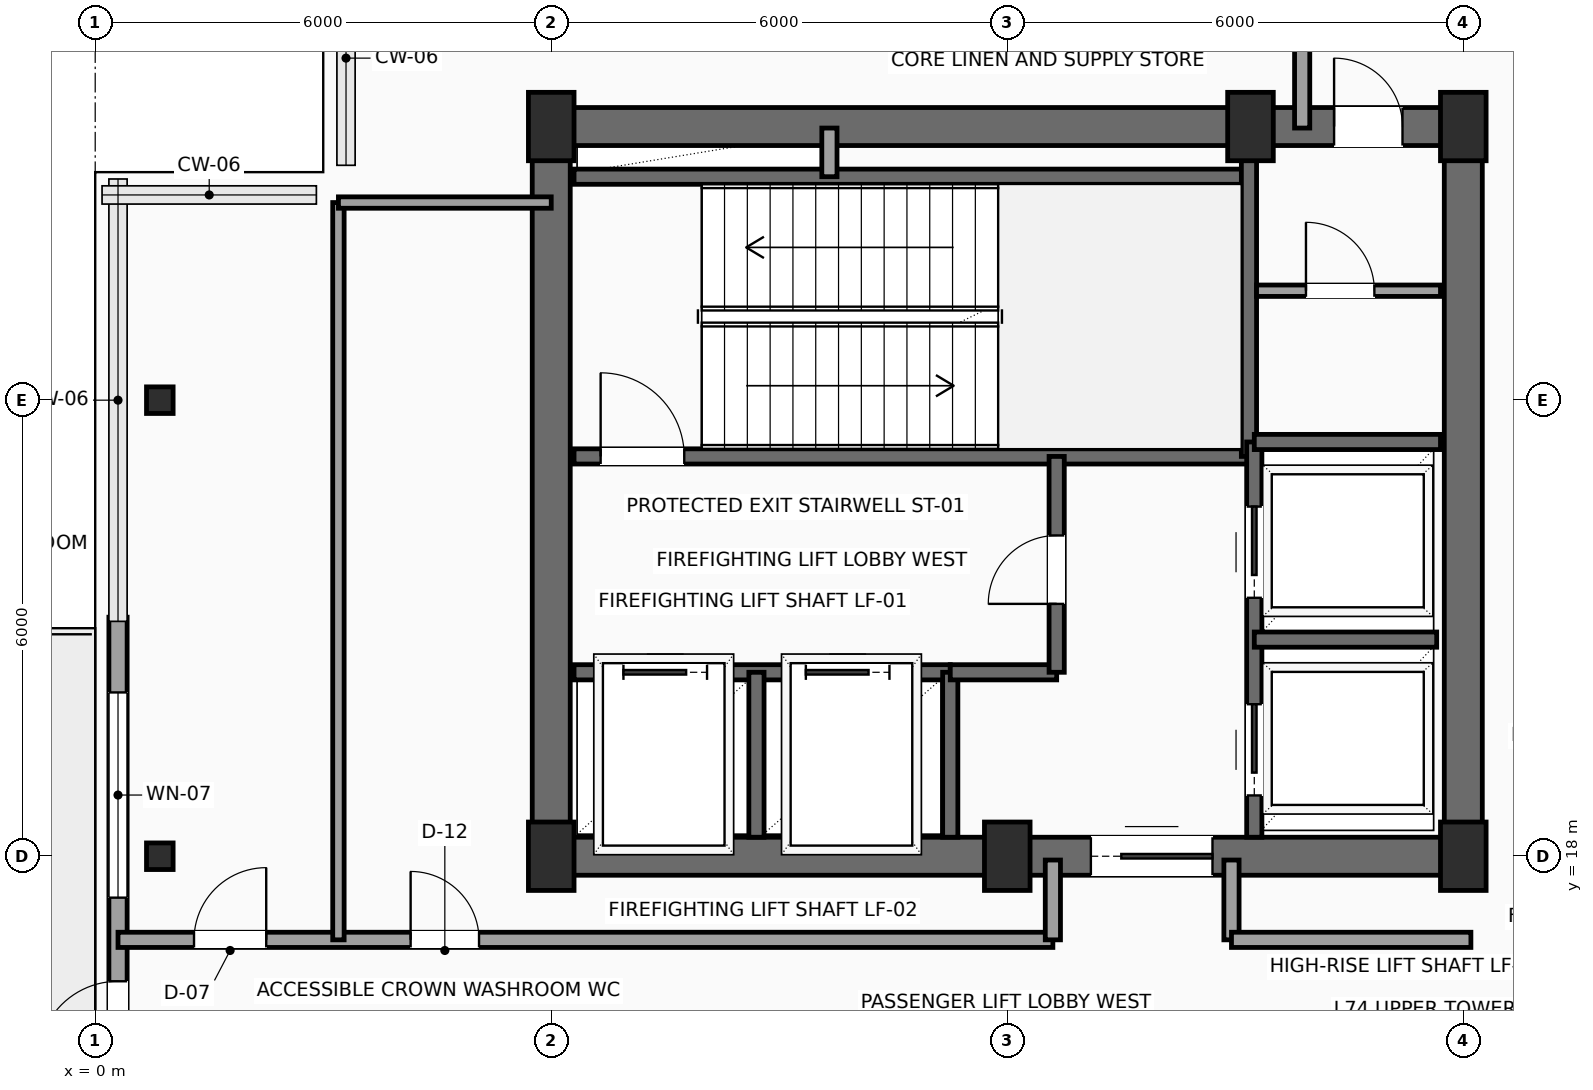
"""IFC4 building model, lengths in metres.
Left out: names, types, materials, properties, quantities, classifications, styles, units other than length and angle.
Written with IfcOpenShell. Run it as: python <this file> out.ifc"""

import sys

from ifc_helpers import new_model, si_unit, direction, frame, frame_2d, origin, origin_2d, place, context, subcontext, project, spatial, rectangle, hollow_rectangle, extrude, element, fill, save


model = new_model("IFC4")
c1 = context("Model", 3, precision=1e-05, world=origin(), true_north=direction((0.0, 1.0)))
c2 = subcontext(c1, "Body", "Model", "MODEL_VIEW")
j1 = project(units=[si_unit("LENGTHUNIT", "METRE"), si_unit("PLANEANGLEUNIT", "RADIAN")], contexts=[c1])
p1 = place(None, origin())
s1 = spatial("IfcSite", under=j1, at=p1, CompositionType="ELEMENT")
p2 = place(p1, origin())
s2 = spatial("IfcBuilding", under=s1, at=p2, CompositionType="ELEMENT")
p3 = place(p2, frame((0.0, 0.0, 292.2)))
s3 = spatial("IfcBuildingStorey", under=s2, at=p3, CompositionType="ELEMENT", Elevation=292.2)
for number, where, z_axis, x_axis in (
    (1, (6.0, 18.0, 0.0), (0.0, 0.0, 1.0), (1.0, 0.0, 0.0)),
    (2, (12.0, 18.0, 0.0), (0.0, 0.0, 1.0), (1.0, 0.0, 0.0)),
    (3, (18.0, 18.0, 0.0), (0.0, 0.0, 1.0), (1.0, 0.0, 0.0)),
    (4, (6.0, 27.6, 0.0), (0.0, 0.0, 1.0), (1.0, 0.0, 0.0)),
    (5, (15.2, 27.6, 0.0), (0.0, 0.0, 1.0), (1.0, 0.0, 0.0)),
    (6, (18.0, 27.6, 0.0), (0.0, 0.0, 1.0), (1.0, 0.0, 0.0)),
):
    element("IfcColumn", number, at=place(p3, frame(where, z_axis=z_axis, x_axis=x_axis)), inside=s3, PredefinedType="COLUMN", context=c2, shape_type="SweptSolid", body=[
        extrude(rectangle(XDim=0.6, YDim=0.9, at=origin_2d()), origin(), (0.0, 0.0, 1.0), 4.2),
    ])
for number, where, z_axis, x_axis in (
    (7, (0.85, 18.0, 0.0), (0.0, 0.0, 1.0), (1.0, 0.0, 0.0)),
    (8, (0.85, 24.0, 0.0), (0.0, 0.0, 1.0), (1.0, 0.0, 0.0)),
):
    element("IfcColumn", number, at=place(p3, frame(where, z_axis=z_axis, x_axis=x_axis)), inside=s3, PredefinedType="COLUMN", context=c2, shape_type="SweptSolid", body=[
        extrude(hollow_rectangle(XDim=0.35, YDim=0.35, WallThickness=0.016, InnerFilletRadius=0.016, OuterFilletRadius=0.032, at=origin_2d()), origin(), (0.0, 0.0, 1.0), 4.2),
    ])
p4 = place(p3, frame((0.3, 11.855, 0.0), z_axis=(0.0, 0.0, 1.0), x_axis=(0.0, 1.0, 0.0)))
e9 = element("IfcWall", 9, at=p4, inside=s3, PredefinedType="SOLIDWALL", context=c2, shape_type="SweptSolid", body=[
    extrude(rectangle(XDim=9.29, YDim=0.24, at=frame_2d((4.645, 0.0))), origin(), (0.0, 0.0, 1.0), 4.0),
])
p5 = place(p4, frame((3.45, 0.0, 0.0)))
e10 = element("IfcOpeningElement", 10, at=p5, cuts=e9, PredefinedType="OPENING", context=c2, shape_type="SweptSolid", body=[
    extrude(rectangle(XDim=1.05, YDim=2.2, at=frame_2d((0.525, 1.1))), frame((0.0, 0.13, 0.0), z_axis=(0.0, -1.0, 0.0), x_axis=(1.0, 0.0, 0.0)), (0.0, 0.0, 1.0), 0.26),
])
p6 = place(p4, frame((5.6, 0.0, 0.6)))
e11 = element("IfcOpeningElement", 11, at=p6, cuts=e9, PredefinedType="OPENING", context=c2, shape_type="SweptSolid", body=[
    extrude(rectangle(XDim=2.7, YDim=2.3, at=frame_2d((1.35, 1.15))), frame((0.0, 0.13, 0.0), z_axis=(0.0, -1.0, 0.0), x_axis=(1.0, 0.0, 0.0)), (0.0, 0.0, 1.0), 0.26),
])
p7 = place(p4, frame((0.7, 0.0, 0.6)))
e12 = element("IfcOpeningElement", 12, at=p7, cuts=e9, PredefinedType="OPENING", context=c2, shape_type="SweptSolid", body=[
    extrude(rectangle(XDim=0.9, YDim=2.2, at=frame_2d((0.45, 1.1))), frame((0.0, 0.13, 0.0), z_axis=(0.0, -1.0, 0.0), x_axis=(1.0, 0.0, 0.0)), (0.0, 0.0, 1.0), 0.26),
])
p8 = place(p3, frame((6.0, 18.0, 0.0), z_axis=(0.0, 0.0, 1.0), x_axis=(1.0, 0.0, 0.0)))
e13 = element("IfcWall", 13, at=p8, inside=s3, PredefinedType="SHEAR", context=c2, shape_type="SweptSolid", body=[
    extrude(rectangle(XDim=12.0, YDim=0.5, at=frame_2d((6.0, 0.0))), origin(), (0.0, 0.0, 1.0), 4.0),
])
p9 = place(p8, frame((7.1, 0.0, 0.0)))
e14 = element("IfcOpeningElement", 14, at=p9, cuts=e13, PredefinedType="OPENING", context=c2, shape_type="SweptSolid", body=[
    extrude(rectangle(XDim=1.6, YDim=2.3, at=frame_2d((0.8, 1.15))), frame((0.0, 0.26, 0.0), z_axis=(0.0, -1.0, 0.0), x_axis=(1.0, 0.0, 0.0)), (0.0, 0.0, 1.0), 0.52),
])
p10 = place(p3, frame((6.0, 27.6, 0.0), z_axis=(0.0, 0.0, 1.0), x_axis=(1.0, 0.0, 0.0)))
e15 = element("IfcWall", 15, at=p10, inside=s3, PredefinedType="SHEAR", context=c2, shape_type="SweptSolid", body=[
    extrude(rectangle(XDim=12.0, YDim=0.5, at=frame_2d((6.0, 0.0))), origin(), (0.0, 0.0, 1.0), 4.0),
])
p11 = place(p10, frame((10.3, 0.0, 0.0)))
e16 = element("IfcOpeningElement", 16, at=p11, cuts=e15, PredefinedType="OPENING", context=c2, shape_type="SweptSolid", body=[
    extrude(rectangle(XDim=0.9, YDim=2.15, at=frame_2d((0.45, 1.075))), frame((0.0, 0.26, 0.0), z_axis=(0.0, -1.0, 0.0), x_axis=(1.0, 0.0, 0.0)), (0.0, 0.0, 1.0), 0.52),
])
for number, where, z_axis, x_axis in (
    (17, (6.0, 18.0, 0.0), (0.0, 0.0, 1.0), (0.0, 1.0, 0.0)),
    (18, (18.0, 18.0, 0.0), (0.0, 0.0, 1.0), (0.0, 1.0, 0.0)),
):
    element("IfcWall", number, at=place(p3, frame(where, z_axis=z_axis, x_axis=x_axis)), inside=s3, PredefinedType="SHEAR", context=c2, shape_type="SweptSolid", body=[
        extrude(rectangle(XDim=9.6, YDim=0.5, at=frame_2d((4.8, 0.0))), origin(), (0.0, 0.0, 1.0), 4.0),
    ])
p12 = place(p3, frame((6.3, 23.26, 0.0), z_axis=(0.0, 0.0, 1.0), x_axis=(1.0, 0.0, 0.0)))
e19 = element("IfcWall", 19, at=p12, inside=s3, PredefinedType="SHEAR", context=c2, shape_type="SweptSolid", body=[
    extrude(rectangle(XDim=8.88, YDim=0.2, at=frame_2d((4.44, 0.0))), origin(), (0.0, 0.0, 1.0), 4.0),
])
p13 = place(p12, frame((0.35, 0.0, 0.0)))
e20 = element("IfcOpeningElement", 20, at=p13, cuts=e19, PredefinedType="OPENING", context=c2, shape_type="SweptSolid", body=[
    extrude(rectangle(XDim=1.1, YDim=2.2, at=frame_2d((0.55, 1.1))), frame((0.0, 0.11, 0.0), z_axis=(0.0, -1.0, 0.0), x_axis=(1.0, 0.0, 0.0)), (0.0, 0.0, 1.0), 0.22),
])
p14 = place(p3, frame((6.3, 26.94, 0.0), z_axis=(0.0, 0.0, 1.0), x_axis=(1.0, 0.0, 0.0)))
e21 = element("IfcWall", 21, at=p14, inside=s3, PredefinedType="SHEAR", context=c2, shape_type="SweptSolid", body=[
    extrude(rectangle(XDim=8.88, YDim=0.2, at=frame_2d((4.44, 0.0))), origin(), (0.0, 0.0, 1.0), 4.0),
])
p15 = place(p3, frame((15.18, 23.26, 0.0), z_axis=(0.0, 0.0, 1.0), x_axis=(0.0, 1.0, 0.0)))
e22 = element("IfcWall", 22, at=p15, inside=s3, PredefinedType="SHEAR", context=c2, shape_type="SweptSolid", body=[
    extrude(rectangle(XDim=4.04, YDim=0.2, at=frame_2d((2.02, 0.0))), origin(), (0.0, 0.0, 1.0), 4.0),
])
p16 = place(p3, frame((6.3, 20.42, 0.0), z_axis=(0.0, 0.0, 1.0), x_axis=(1.0, 0.0, 0.0)))
e23 = element("IfcWall", 23, at=p16, inside=s3, PredefinedType="SHEAR", context=c2, shape_type="SweptSolid", body=[
    extrude(rectangle(XDim=4.95, YDim=0.2, at=frame_2d((2.475, 0.0))), origin(), (0.0, 0.0, 1.0), 4.0),
])
p17 = place(p16, frame((0.65, 0.0, 0.0)))
e24 = element("IfcOpeningElement", 24, at=p17, cuts=e23, PredefinedType="OPENING", context=c2, shape_type="SweptSolid", body=[
    extrude(rectangle(XDim=1.1, YDim=2.2, at=frame_2d((0.55, 1.1))), frame((0.0, 0.11, 0.0), z_axis=(0.0, -1.0, 0.0), x_axis=(1.0, 0.0, 0.0)), (0.0, 0.0, 1.0), 0.22),
])
p18 = place(p16, frame((3.05, 0.0, 0.0)))
e25 = element("IfcOpeningElement", 25, at=p18, cuts=e23, PredefinedType="OPENING", context=c2, shape_type="SweptSolid", body=[
    extrude(rectangle(XDim=1.1, YDim=2.2, at=frame_2d((0.55, 1.1))), frame((0.0, 0.11, 0.0), z_axis=(0.0, -1.0, 0.0), x_axis=(1.0, 0.0, 0.0)), (0.0, 0.0, 1.0), 0.22),
])
for number, where, z_axis, x_axis in (
    (26, (8.7, 18.25, 0.0), (0.0, 0.0, 1.0), (0.0, 1.0, 0.0)),
    (27, (11.25, 18.25, 0.0), (0.0, 0.0, 1.0), (0.0, 1.0, 0.0)),
):
    element("IfcWall", number, at=place(p3, frame(where, z_axis=z_axis, x_axis=x_axis)), inside=s3, PredefinedType="SHEAR", context=c2, shape_type="SweptSolid", body=[
        extrude(rectangle(XDim=2.17, YDim=0.2, at=frame_2d((1.085, 0.0))), origin(), (0.0, 0.0, 1.0), 4.0),
    ])
p19 = place(p3, frame((11.25, 20.42, 0.0), z_axis=(0.0, 0.0, 1.0), x_axis=(1.0, 0.0, 0.0)))
e28 = element("IfcWall", 28, at=p19, inside=s3, PredefinedType="SHEAR", context=c2, shape_type="SweptSolid", body=[
    extrude(rectangle(XDim=1.4, YDim=0.2, at=frame_2d((0.7, 0.0))), origin(), (0.0, 0.0, 1.0), 4.0),
])
p20 = place(p3, frame((12.65, 20.42, 0.0), z_axis=(0.0, 0.0, 1.0), x_axis=(0.0, 1.0, 0.0)))
e29 = element("IfcWall", 29, at=p20, inside=s3, PredefinedType="SHEAR", context=c2, shape_type="SweptSolid", body=[
    extrude(rectangle(XDim=2.84, YDim=0.2, at=frame_2d((1.42, 0.0))), origin(), (0.0, 0.0, 1.0), 4.0),
])
p21 = place(p20, frame((0.9, 0.0, 0.0)))
e30 = element("IfcOpeningElement", 30, at=p21, cuts=e29, PredefinedType="OPENING", context=c2, shape_type="SweptSolid", body=[
    extrude(rectangle(XDim=0.9, YDim=2.15, at=frame_2d((0.45, 1.075))), frame((0.0, 0.11, 0.0), z_axis=(0.0, -1.0, 0.0), x_axis=(1.0, 0.0, 0.0)), (0.0, 0.0, 1.0), 0.22),
])
p22 = place(p3, frame((9.66, 26.94, 0.0), z_axis=(0.0, 0.0, 1.0), x_axis=(0.0, 1.0, 0.0)))
e31 = element("IfcWall", 31, at=p22, inside=s3, PredefinedType="SOLIDWALL", context=c2, shape_type="SweptSolid", body=[
    extrude(rectangle(XDim=0.64, YDim=0.2, at=frame_2d((0.32, 0.0))), origin(), (0.0, 0.0, 1.0), 4.0),
])
p23 = place(p3, frame((15.25, 18.25, 0.0), z_axis=(0.0, 0.0, 1.0), x_axis=(0.0, 1.0, 0.0)))
e32 = element("IfcWall", 32, at=p23, inside=s3, PredefinedType="SHEAR", context=c2, shape_type="SweptSolid", body=[
    extrude(rectangle(XDim=5.2, YDim=0.2, at=frame_2d((2.6, 0.0))), origin(), (0.0, 0.0, 1.0), 4.0),
])
p24 = place(p23, frame((0.55, 0.0, 0.0)))
e33 = element("IfcOpeningElement", 33, at=p24, cuts=e32, PredefinedType="OPENING", context=c2, shape_type="SweptSolid", body=[
    extrude(rectangle(XDim=1.2, YDim=2.2, at=frame_2d((0.6, 1.1))), frame((0.0, 0.11, 0.0), z_axis=(0.0, -1.0, 0.0), x_axis=(1.0, 0.0, 0.0)), (0.0, 0.0, 1.0), 0.22),
])
p25 = place(p23, frame((3.15, 0.0, 0.0)))
e34 = element("IfcOpeningElement", 34, at=p25, cuts=e32, PredefinedType="OPENING", context=c2, shape_type="SweptSolid", body=[
    extrude(rectangle(XDim=1.2, YDim=2.2, at=frame_2d((0.6, 1.1))), frame((0.0, 0.11, 0.0), z_axis=(0.0, -1.0, 0.0), x_axis=(1.0, 0.0, 0.0)), (0.0, 0.0, 1.0), 0.22),
])
p26 = place(p3, frame((15.25, 20.85, 0.0), z_axis=(0.0, 0.0, 1.0), x_axis=(1.0, 0.0, 0.0)))
e35 = element("IfcWall", 35, at=p26, inside=s3, PredefinedType="SHEAR", context=c2, shape_type="SweptSolid", body=[
    extrude(rectangle(XDim=2.4, YDim=0.2, at=frame_2d((1.2, 0.0))), origin(), (0.0, 0.0, 1.0), 4.0),
])
p27 = place(p3, frame((15.25, 23.45, 0.0), z_axis=(0.0, 0.0, 1.0), x_axis=(1.0, 0.0, 0.0)))
e36 = element("IfcWall", 36, at=p27, inside=s3, PredefinedType="SHEAR", context=c2, shape_type="SweptSolid", body=[
    extrude(rectangle(XDim=2.45, YDim=0.2, at=frame_2d((1.225, 0.0))), origin(), (0.0, 0.0, 1.0), 4.0),
])
p28 = place(p3, frame((15.28, 25.44, 0.0), z_axis=(0.0, 0.0, 1.0), x_axis=(1.0, 0.0, 0.0)))
e37 = element("IfcWall", 37, at=p28, inside=s3, PredefinedType="PARTITIONING", context=c2, shape_type="SweptSolid", body=[
    extrude(rectangle(XDim=2.42, YDim=0.15, at=frame_2d((1.21, 0.0))), origin(), (0.0, 0.0, 1.0), 4.0),
])
p29 = place(p28, frame((0.65, 0.0, 0.0)))
e38 = element("IfcOpeningElement", 38, at=p29, cuts=e37, PredefinedType="OPENING", context=c2, shape_type="SweptSolid", body=[
    extrude(rectangle(XDim=0.9, YDim=2.15, at=frame_2d((0.45, 1.075))), frame((0.0, 0.085, 0.0), z_axis=(0.0, -1.0, 0.0), x_axis=(1.0, 0.0, 0.0)), (0.0, 0.0, 1.0), 0.17),
])
p30 = place(p3, frame((0.3, 16.9, 0.0), z_axis=(0.0, 0.0, 1.0), x_axis=(1.0, 0.0, 0.0)))
e39 = element("IfcWall", 39, at=p30, inside=s3, PredefinedType="PARTITIONING", context=c2, shape_type="SweptSolid", body=[
    extrude(rectangle(XDim=12.3, YDim=0.2, at=frame_2d((6.15, 0.0))), origin(), (0.0, 0.0, 1.0), 4.0),
])
p31 = place(p30, frame((1.0, 0.0, 0.0)))
e40 = element("IfcOpeningElement", 40, at=p31, cuts=e39, PredefinedType="OPENING", context=c2, shape_type="SweptSolid", body=[
    extrude(rectangle(XDim=0.95, YDim=2.15, at=frame_2d((0.475, 1.075))), frame((0.0, 0.11, 0.0), z_axis=(0.0, -1.0, 0.0), x_axis=(1.0, 0.0, 0.0)), (0.0, 0.0, 1.0), 0.22),
])
p32 = place(p30, frame((3.85, 0.0, 0.0)))
e41 = element("IfcOpeningElement", 41, at=p32, cuts=e39, PredefinedType="OPENING", context=c2, shape_type="SweptSolid", body=[
    extrude(rectangle(XDim=0.9, YDim=2.1, at=frame_2d((0.45, 1.05))), frame((0.0, 0.11, 0.0), z_axis=(0.0, -1.0, 0.0), x_axis=(1.0, 0.0, 0.0)), (0.0, 0.0, 1.0), 0.22),
])
for number, where, z_axis, x_axis in (
    (42, (12.6, 16.9, 0.0), (0.0, 0.0, 1.0), (0.0, 1.0, 0.0)),
    (43, (14.95, 17.95, 0.0), (0.0, 0.0, 1.0), (0.0, -1.0, 0.0)),
):
    element("IfcWall", number, at=place(p3, frame(where, z_axis=z_axis, x_axis=x_axis)), inside=s3, PredefinedType="PARTITIONING", context=c2, shape_type="SweptSolid", body=[
        extrude(rectangle(XDim=1.05, YDim=0.2, at=frame_2d((0.525, 0.0))), origin(), (0.0, 0.0, 1.0), 4.0),
    ])
p33 = place(p3, frame((14.95, 16.9, 0.0), z_axis=(0.0, 0.0, 1.0), x_axis=(1.0, 0.0, 0.0)))
e44 = element("IfcWall", 44, at=p33, inside=s3, PredefinedType="PARTITIONING", context=c2, shape_type="SweptSolid", body=[
    extrude(rectangle(XDim=3.15, YDim=0.2, at=frame_2d((1.575, 0.0))), origin(), (0.0, 0.0, 1.0), 4.0),
])
p34 = place(p3, frame((15.88, 27.58, 0.0), z_axis=(0.0, 0.0, 1.0), x_axis=(0.0, 1.0, 0.0)))
e45 = element("IfcWall", 45, at=p34, inside=s3, PredefinedType="PARTITIONING", context=c2, shape_type="SweptSolid", body=[
    extrude(rectangle(XDim=2.12, YDim=0.2, at=frame_2d((1.06, 0.0))), origin(), (0.0, 0.0, 1.0), 4.0),
])
p35 = place(p3, frame((3.2, 16.9, 0.0), z_axis=(0.0, 0.0, 1.0), x_axis=(0.0, 1.0, 0.0)))
e46 = element("IfcWall", 46, at=p35, inside=s3, PredefinedType="PARTITIONING", context=c2, shape_type="SweptSolid", body=[
    extrude(rectangle(XDim=9.7, YDim=0.15, at=frame_2d((4.85, 0.0))), origin(), (0.0, 0.0, 1.0), 4.0),
])
p36 = place(p3, frame((3.2, 26.6, 0.0), z_axis=(0.0, 0.0, 1.0), x_axis=(1.0, 0.0, 0.0)))
e47 = element("IfcWall", 47, at=p36, inside=s3, PredefinedType="PARTITIONING", context=c2, shape_type="SweptSolid", body=[
    extrude(rectangle(XDim=2.8, YDim=0.15, at=frame_2d((1.4, 0.0))), origin(), (0.0, 0.0, 1.0), 4.0),
])
p37 = place(p5, origin())
e48 = element("IfcDoor", 48, at=p37, inside=s3, OperationType="SINGLE_SWING_LEFT", PredefinedType="DOOR", context=c2, shape_type="SweptSolid", body=[
    extrude(rectangle(XDim=1.05, YDim=2.2, at=frame_2d((0.525, 1.1))), frame((0.0, 0.025, 0.0), z_axis=(0.0, -1.0, 0.0), x_axis=(1.0, 0.0, 0.0)), (0.0, 0.0, 1.0), 0.05),
])
fill(e10, e48)
p38 = place(p6, origin())
e49 = element("IfcWindow", 49, at=p38, inside=s3, PartitioningType="SINGLE_PANEL", PredefinedType="WINDOW", context=c2, shape_type="SweptSolid", body=[
    extrude(rectangle(XDim=2.7, YDim=2.3, at=frame_2d((1.35, 1.15))), frame((0.0, 0.03, 0.0), z_axis=(0.0, -1.0, 0.0), x_axis=(1.0, 0.0, 0.0)), (0.0, 0.0, 1.0), 0.06),
])
fill(e11, e49)
p39 = place(p9, origin())
e50 = element("IfcDoor", 50, at=p39, inside=s3, OperationType="DOUBLE_DOOR_SLIDING", PredefinedType="DOOR", context=c2, shape_type="SweptSolid", body=[
    extrude(rectangle(XDim=1.6, YDim=2.3, at=frame_2d((0.8, 1.15))), frame((0.0, 0.025, 0.0), z_axis=(0.0, -1.0, 0.0), x_axis=(1.0, 0.0, 0.0)), (0.0, 0.0, 1.0), 0.05),
])
fill(e14, e50)
p40 = place(p11, origin())
e51 = element("IfcDoor", 51, at=p40, inside=s3, OperationType="SINGLE_SWING_LEFT", PredefinedType="DOOR", context=c2, shape_type="SweptSolid", body=[
    extrude(rectangle(XDim=0.9, YDim=2.15, at=frame_2d((0.45, 1.075))), frame((0.0, 0.025, 0.0), z_axis=(0.0, -1.0, 0.0), x_axis=(1.0, 0.0, 0.0)), (0.0, 0.0, 1.0), 0.05),
])
fill(e16, e51)
p41 = place(p13, origin())
e52 = element("IfcDoor", 52, at=p41, inside=s3, OperationType="SINGLE_SWING_LEFT", PredefinedType="DOOR", context=c2, shape_type="SweptSolid", body=[
    extrude(rectangle(XDim=1.1, YDim=2.2, at=frame_2d((0.55, 1.1))), frame((0.0, 0.025, 0.0), z_axis=(0.0, -1.0, 0.0), x_axis=(1.0, 0.0, 0.0)), (0.0, 0.0, 1.0), 0.05),
])
fill(e20, e52)
p42 = place(p17, origin())
e53 = element("IfcDoor", 53, at=p42, inside=s3, OperationType="SLIDING_TO_LEFT", PredefinedType="DOOR", context=c2, shape_type="SweptSolid", body=[
    extrude(rectangle(XDim=1.1, YDim=2.2, at=frame_2d((0.55, 1.1))), frame((0.0, 0.025, 0.0), z_axis=(0.0, -1.0, 0.0), x_axis=(1.0, 0.0, 0.0)), (0.0, 0.0, 1.0), 0.05),
])
fill(e24, e53)
p43 = place(p18, origin())
e54 = element("IfcDoor", 54, at=p43, inside=s3, OperationType="SLIDING_TO_LEFT", PredefinedType="DOOR", context=c2, shape_type="SweptSolid", body=[
    extrude(rectangle(XDim=1.1, YDim=2.2, at=frame_2d((0.55, 1.1))), frame((0.0, 0.025, 0.0), z_axis=(0.0, -1.0, 0.0), x_axis=(1.0, 0.0, 0.0)), (0.0, 0.0, 1.0), 0.05),
])
fill(e25, e54)
p44 = place(p21, origin())
e55 = element("IfcDoor", 55, at=p44, inside=s3, OperationType="SINGLE_SWING_LEFT", PredefinedType="DOOR", context=c2, shape_type="SweptSolid", body=[
    extrude(rectangle(XDim=0.9, YDim=2.15, at=frame_2d((0.45, 1.075))), frame((0.0, 0.025, 0.0), z_axis=(0.0, -1.0, 0.0), x_axis=(1.0, 0.0, 0.0)), (0.0, 0.0, 1.0), 0.05),
])
fill(e30, e55)
p45 = place(p24, origin())
e56 = element("IfcDoor", 56, at=p45, inside=s3, OperationType="SLIDING_TO_RIGHT", PredefinedType="DOOR", context=c2, shape_type="SweptSolid", body=[
    extrude(rectangle(XDim=1.2, YDim=2.2, at=frame_2d((0.6, 1.1))), frame((0.0, 0.025, 0.0), z_axis=(0.0, -1.0, 0.0), x_axis=(1.0, 0.0, 0.0)), (0.0, 0.0, 1.0), 0.05),
])
fill(e33, e56)
p46 = place(p25, origin())
e57 = element("IfcDoor", 57, at=p46, inside=s3, OperationType="SLIDING_TO_RIGHT", PredefinedType="DOOR", context=c2, shape_type="SweptSolid", body=[
    extrude(rectangle(XDim=1.2, YDim=2.2, at=frame_2d((0.6, 1.1))), frame((0.0, 0.025, 0.0), z_axis=(0.0, -1.0, 0.0), x_axis=(1.0, 0.0, 0.0)), (0.0, 0.0, 1.0), 0.05),
])
fill(e34, e57)
p47 = place(p29, origin())
e58 = element("IfcDoor", 58, at=p47, inside=s3, OperationType="SINGLE_SWING_LEFT", PredefinedType="DOOR", context=c2, shape_type="SweptSolid", body=[
    extrude(rectangle(XDim=0.9, YDim=2.15, at=frame_2d((0.45, 1.075))), frame((0.0, 0.025, 0.0), z_axis=(0.0, -1.0, 0.0), x_axis=(1.0, 0.0, 0.0)), (0.0, 0.0, 1.0), 0.05),
])
fill(e38, e58)
p48 = place(p31, origin())
e59 = element("IfcDoor", 59, at=p48, inside=s3, OperationType="SINGLE_SWING_RIGHT", PredefinedType="DOOR", context=c2, shape_type="SweptSolid", body=[
    extrude(rectangle(XDim=0.95, YDim=2.15, at=frame_2d((0.475, 1.075))), frame((0.0, 0.025, 0.0), z_axis=(0.0, -1.0, 0.0), x_axis=(1.0, 0.0, 0.0)), (0.0, 0.0, 1.0), 0.05),
])
fill(e40, e59)
p49 = place(p32, origin())
e60 = element("IfcDoor", 60, at=p49, inside=s3, OperationType="SINGLE_SWING_LEFT", PredefinedType="DOOR", context=c2, shape_type="SweptSolid", body=[
    extrude(rectangle(XDim=0.9, YDim=2.1, at=frame_2d((0.45, 1.05))), frame((0.0, 0.025, 0.0), z_axis=(0.0, -1.0, 0.0), x_axis=(1.0, 0.0, 0.0)), (0.0, 0.0, 1.0), 0.05),
])
fill(e41, e60)
save(model, sys.argv[1])
